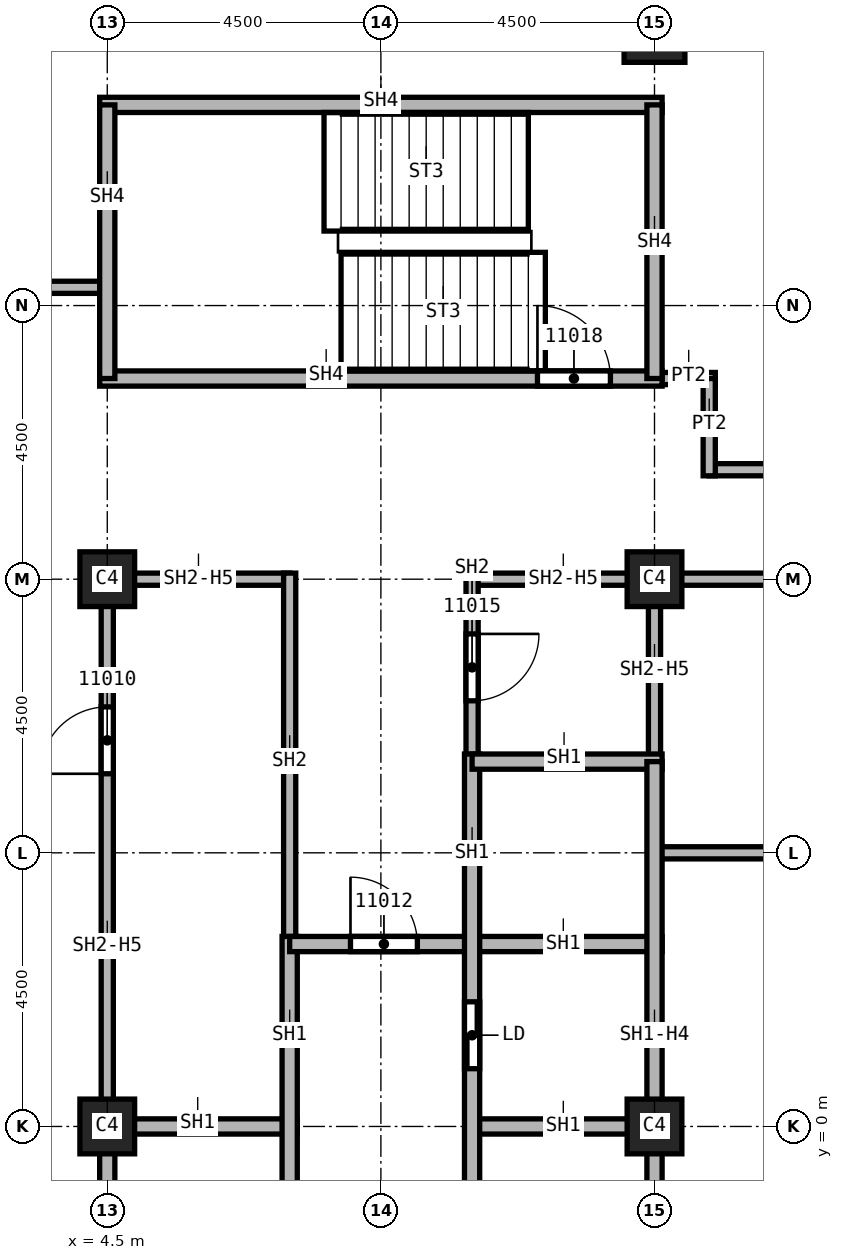
"""IFC4 building model, lengths in metres.
Left out: names, types, materials, properties, quantities, classifications, styles, units other than length and angle.
Written with IfcOpenShell. Run it as: python <this file> out.ifc"""

import sys

from ifc_helpers import new_model, si_unit, direction, frame, frame_2d, origin, origin_2d, place, context, subcontext, project, spatial, rectangle, extrude, element, fill, save


model = new_model("IFC4")
c1 = context("Model", 3, precision=1e-05, world=origin(), true_north=direction((0.0, 1.0)))
c2 = subcontext(c1, "Body", "Model", "MODEL_VIEW")
j1 = project(units=[si_unit("LENGTHUNIT", "METRE"), si_unit("PLANEANGLEUNIT", "RADIAN")], contexts=[c1])
p1 = place(None, origin())
s1 = spatial("IfcSite", under=j1, at=p1, CompositionType="ELEMENT")
p2 = place(p1, origin())
s2 = spatial("IfcBuilding", under=s1, at=p2, CompositionType="ELEMENT")
p3 = place(p2, frame((0.0, 0.0, 184.0)))
s3 = spatial("IfcBuildingStorey", under=s2, at=p3, CompositionType="ELEMENT", Elevation=184.0)
p4 = place(p3, frame((13.5, 18.0, 0.0), z_axis=(0.0, 0.0, 1.0), x_axis=(1.0, 0.0, 0.0)))
e1 = element("IfcColumn", 1, at=p4, inside=s3, PredefinedType="COLUMN", context=c2, shape_type="SweptSolid", body=[
    extrude(rectangle(XDim=1.0, YDim=1.0, at=origin_2d()), origin(), (0.0, 0.0, 1.0), 3.72),
])
for number, where, z_axis, x_axis in (
    (2, (4.5, 0.0, 0.0), (0.0, 0.0, 1.0), (1.0, 0.0, 0.0)),
    (3, (4.5, 9.0, 0.0), (0.0, 0.0, 1.0), (1.0, 0.0, 0.0)),
    (4, (13.5, 0.0, 0.0), (0.0, 0.0, 1.0), (1.0, 0.0, 0.0)),
    (5, (13.5, 9.0, 0.0), (0.0, 0.0, 1.0), (1.0, 0.0, 0.0)),
):
    element("IfcColumn", number, at=place(p3, frame(where, z_axis=z_axis, x_axis=x_axis)), inside=s3, PredefinedType="COLUMN", context=c2, shape_type="SweptSolid", body=[
        extrude(rectangle(XDim=0.9, YDim=0.9, at=origin_2d()), origin(), (0.0, 0.0, 1.0), 3.72),
    ])
p5 = place(p3, frame((0.9, 13.8, 0.0), z_axis=(0.0, 0.0, 1.0), x_axis=(1.0, 0.0, 0.0)))
e6 = element("IfcWall", 6, at=p5, inside=s3, PredefinedType="PARTITIONING", context=c2, shape_type="SweptSolid", body=[
    extrude(rectangle(XDim=3.6, YDim=0.2, at=frame_2d((1.8, 0.0))), origin(), (0.0, 0.0, 1.0), 3.113),
])
p6 = place(p3, frame((13.375, 12.3, 0.0), z_axis=(0.0, 0.0, 1.0), x_axis=(1.0, 0.0, 0.0)))
e7 = element("IfcWall", 7, at=p6, inside=s3, PredefinedType="PARTITIONING", context=c2, shape_type="SweptSolid", body=[
    extrude(rectangle(XDim=1.125, YDim=0.2, at=frame_2d((0.562, 0.0))), origin(), (0.0, 0.0, 1.0), 3.72),
])
for number, where, z_axis, x_axis in (
    (8, (13.5, 4.5, 0.0), (0.0, 0.0, 1.0), (1.0, 0.0, 0.0)),
    (9, (18.0, 9.0, 0.0), (0.0, 0.0, 1.0), (-1.0, 0.0, 0.0)),
):
    element("IfcWall", number, at=place(p3, frame(where, z_axis=z_axis, x_axis=x_axis)), inside=s3, PredefinedType="PARTITIONING", context=c2, shape_type="SweptSolid", body=[
        extrude(rectangle(XDim=4.5, YDim=0.2, at=frame_2d((2.25, 0.0))), origin(), (0.0, 0.0, 1.0), 3.72),
    ])
p7 = place(p3, frame((14.4, 10.8, 0.0), z_axis=(0.0, 0.0, 1.0), x_axis=(1.0, 0.0, 0.0)))
e10 = element("IfcWall", 10, at=p7, inside=s3, PredefinedType="PARTITIONING", context=c2, shape_type="SweptSolid", body=[
    extrude(rectangle(XDim=3.6, YDim=0.2, at=frame_2d((1.8, 0.0))), origin(), (0.0, 0.0, 1.0), 3.72),
])
p8 = place(p3, frame((14.4, 12.3, 0.0), z_axis=(0.0, 0.0, 1.0), x_axis=(0.0, -1.0, 0.0)))
e11 = element("IfcWall", 11, at=p8, inside=s3, PredefinedType="PARTITIONING", context=c2, shape_type="SweptSolid", body=[
    extrude(rectangle(XDim=1.6, YDim=0.2, at=frame_2d((0.8, 0.0))), origin(), (0.0, 0.0, 1.0), 3.72),
])
p9 = place(p3, frame((4.5, 0.0, 0.0), z_axis=(0.0, 0.0, 1.0), x_axis=(0.0, 1.0, 0.0)))
e12 = element("IfcWall", 12, at=p9, inside=s3, PredefinedType="SOLIDWALL", context=c2, shape_type="SweptSolid", body=[
    extrude(rectangle(XDim=9.1, YDim=0.2, at=frame_2d((4.55, 0.0))), origin(), (0.0, 0.0, 1.0), 2.958),
])
p10 = place(p9, frame((5.8, 0.0, 0.0)))
e13 = element("IfcOpeningElement", 13, at=p10, cuts=e12, PredefinedType="OPENING", context=c2, shape_type="SweptSolid", body=[
    extrude(rectangle(XDim=1.1, YDim=2.1, at=frame_2d((0.55, 1.05))), frame((0.0, 0.1, 0.0), z_axis=(0.0, -1.0, 0.0), x_axis=(1.0, 0.0, 0.0)), (0.0, 0.0, 1.0), 0.2),
])
p11 = place(p3, frame((4.5, 9.0, 0.0), z_axis=(0.0, 0.0, 1.0), x_axis=(1.0, 0.0, 0.0)))
e14 = element("IfcWall", 14, at=p11, inside=s3, PredefinedType="SOLIDWALL", context=c2, shape_type="SweptSolid", body=[
    extrude(rectangle(XDim=3.0, YDim=0.2, at=frame_2d((1.5, 0.0))), origin(), (0.0, 0.0, 1.0), 2.958),
])
p12 = place(p3, frame((7.5, 9.1, 0.0), z_axis=(0.0, 0.0, 1.0), x_axis=(0.0, -1.0, 0.0)))
e15 = element("IfcWall", 15, at=p12, inside=s3, PredefinedType="SOLIDWALL", context=c2, shape_type="SweptSolid", body=[
    extrude(rectangle(XDim=6.225, YDim=0.2, at=frame_2d((3.113, 0.0))), origin(), (0.0, 0.0, 1.0), 3.72),
])
p13 = place(p3, frame((10.5, 9.0, 0.0), z_axis=(0.0, 0.0, 1.0), x_axis=(1.0, 0.0, 0.0)))
e16 = element("IfcWall", 16, at=p13, inside=s3, PredefinedType="SOLIDWALL", context=c2, shape_type="SweptSolid", body=[
    extrude(rectangle(XDim=3.1, YDim=0.2, at=frame_2d((1.55, 0.0))), origin(), (0.0, 0.0, 1.0), 2.958),
])
p14 = place(p3, frame((10.5, 9.1, 0.0), z_axis=(0.0, 0.0, 1.0), x_axis=(0.0, -1.0, 0.0)))
e17 = element("IfcWall", 17, at=p14, inside=s3, PredefinedType="SOLIDWALL", context=c2, shape_type="SweptSolid", body=[
    extrude(rectangle(XDim=3.225, YDim=0.2, at=frame_2d((1.613, 0.0))), origin(), (0.0, 0.0, 1.0), 3.72),
])
p15 = place(p14, frame((1.0, 0.0, 0.0)))
e18 = element("IfcOpeningElement", 18, at=p15, cuts=e17, PredefinedType="OPENING", context=c2, shape_type="SweptSolid", body=[
    extrude(rectangle(XDim=1.1, YDim=2.1, at=frame_2d((0.55, 1.05))), frame((0.0, 0.1, 0.0), z_axis=(0.0, -1.0, 0.0), x_axis=(1.0, 0.0, 0.0)), (0.0, 0.0, 1.0), 0.2),
])
p16 = place(p3, frame((13.5, 9.1, 0.0), z_axis=(0.0, 0.0, 1.0), x_axis=(0.0, -1.0, 0.0)))
e19 = element("IfcWall", 19, at=p16, inside=s3, PredefinedType="SOLIDWALL", context=c2, shape_type="SweptSolid", body=[
    extrude(rectangle(XDim=3.1, YDim=0.2, at=frame_2d((1.55, 0.0))), origin(), (0.0, 0.0, 1.0), 2.958),
])
p17 = place(p3, frame((4.375, 0.0, 0.0), z_axis=(0.0, 0.0, 1.0), x_axis=(1.0, 0.0, 0.0)))
e20 = element("IfcWall", 20, at=p17, inside=s3, PredefinedType="SOLIDWALL", context=c2, shape_type="SweptSolid", body=[
    extrude(rectangle(XDim=3.25, YDim=0.25, at=frame_2d((1.625, 0.0))), origin(), (0.0, 0.0, 1.0), 3.72),
])
p18 = place(p3, frame((4.5, -6.0, 0.0), z_axis=(0.0, 0.0, 1.0), x_axis=(0.0, 1.0, 0.0)))
e21 = element("IfcWall", 21, at=p18, inside=s3, PredefinedType="SOLIDWALL", context=c2, shape_type="SweptSolid", body=[
    extrude(rectangle(XDim=6.0, YDim=0.25, at=frame_2d((3.0, 0.0))), origin(), (0.0, 0.0, 1.0), 2.958),
])
p19 = place(p18, frame((0.95, 0.0, 0.0)))
e22 = element("IfcOpeningElement", 22, at=p19, cuts=e21, PredefinedType="OPENING", context=c2, shape_type="SweptSolid", body=[
    extrude(rectangle(XDim=1.1, YDim=2.1, at=frame_2d((0.55, 1.05))), frame((0.0, 0.125, 0.0), z_axis=(0.0, -1.0, 0.0), x_axis=(1.0, 0.0, 0.0)), (0.0, 0.0, 1.0), 0.25),
])
p20 = place(p18, frame((3.95, 0.0, 0.0)))
e23 = element("IfcOpeningElement", 23, at=p20, cuts=e21, PredefinedType="OPENING", context=c2, shape_type="SweptSolid", body=[
    extrude(rectangle(XDim=1.1, YDim=2.1, at=frame_2d((0.55, 1.05))), frame((0.0, 0.125, 0.0), z_axis=(0.0, -1.0, 0.0), x_axis=(1.0, 0.0, 0.0)), (0.0, 0.0, 1.0), 0.25),
])
p21 = place(p3, frame((7.5, 3.125, 0.0), z_axis=(0.0, 0.0, 1.0), x_axis=(0.0, -1.0, 0.0)))
e24 = element("IfcWall", 24, at=p21, inside=s3, PredefinedType="SOLIDWALL", context=c2, shape_type="SweptSolid", body=[
    extrude(rectangle(XDim=9.125, YDim=0.25, at=frame_2d((4.562, 0.0))), origin(), (0.0, 0.0, 1.0), 3.72),
])
p22 = place(p3, frame((7.5, 3.0, 0.0), z_axis=(0.0, 0.0, 1.0), x_axis=(1.0, 0.0, 0.0)))
e25 = element("IfcWall", 25, at=p22, inside=s3, PredefinedType="SOLIDWALL", context=c2, shape_type="SweptSolid", body=[
    extrude(rectangle(XDim=6.125, YDim=0.25, at=frame_2d((3.062, 0.0))), origin(), (0.0, 0.0, 1.0), 3.72),
])
p23 = place(p22, frame((1.0, 0.0, 0.0)))
e26 = element("IfcOpeningElement", 26, at=p23, cuts=e25, PredefinedType="OPENING", context=c2, shape_type="SweptSolid", body=[
    extrude(rectangle(XDim=1.1, YDim=2.1, at=frame_2d((0.55, 1.05))), frame((0.0, 0.125, 0.0), z_axis=(0.0, -1.0, 0.0), x_axis=(1.0, 0.0, 0.0)), (0.0, 0.0, 1.0), 0.25),
])
p24 = place(p3, frame((10.5, 0.0, 0.0), z_axis=(0.0, 0.0, 1.0), x_axis=(1.0, 0.0, 0.0)))
e27 = element("IfcWall", 27, at=p24, inside=s3, PredefinedType="SOLIDWALL", context=c2, shape_type="SweptSolid", body=[
    extrude(rectangle(XDim=3.125, YDim=0.25, at=frame_2d((1.562, 0.0))), origin(), (0.0, 0.0, 1.0), 3.72),
])
p25 = place(p3, frame((10.5, 6.125, 0.0), z_axis=(0.0, 0.0, 1.0), x_axis=(0.0, -1.0, 0.0)))
e28 = element("IfcWall", 28, at=p25, inside=s3, PredefinedType="SOLIDWALL", context=c2, shape_type="SweptSolid", body=[
    extrude(rectangle(XDim=9.25, YDim=0.25, at=frame_2d((4.625, 0.0))), origin(), (0.0, 0.0, 1.0), 3.72),
])
p26 = place(p25, frame((7.075, 0.0, 0.0)))
e29 = element("IfcOpeningElement", 29, at=p26, cuts=e28, PredefinedType="OPENING", context=c2, shape_type="SweptSolid", body=[
    extrude(rectangle(XDim=1.1, YDim=2.1, at=frame_2d((0.55, 1.05))), frame((0.0, 0.125, 0.0), z_axis=(0.0, -1.0, 0.0), x_axis=(1.0, 0.0, 0.0)), (0.0, 0.0, 1.0), 0.25),
])
p27 = place(p25, frame((4.075, 0.0, 0.0)))
e30 = element("IfcOpeningElement", 30, at=p27, cuts=e28, PredefinedType="OPENING", context=c2, shape_type="SweptSolid", body=[
    extrude(rectangle(XDim=1.1, YDim=2.1, at=frame_2d((0.55, 1.05))), frame((0.0, 0.125, 0.0), z_axis=(0.0, -1.0, 0.0), x_axis=(1.0, 0.0, 0.0)), (0.0, 0.0, 1.0), 0.25),
])
p28 = place(p3, frame((10.5, 6.0, 0.0), z_axis=(0.0, 0.0, 1.0), x_axis=(1.0, 0.0, 0.0)))
e31 = element("IfcWall", 31, at=p28, inside=s3, PredefinedType="SOLIDWALL", context=c2, shape_type="SweptSolid", body=[
    extrude(rectangle(XDim=3.125, YDim=0.25, at=frame_2d((1.562, 0.0))), origin(), (0.0, 0.0, 1.0), 3.72),
])
p29 = place(p3, frame((13.5, 6.0, 0.0), z_axis=(0.0, 0.0, 1.0), x_axis=(0.0, -1.0, 0.0)))
e32 = element("IfcWall", 32, at=p29, inside=s3, PredefinedType="SOLIDWALL", context=c2, shape_type="SweptSolid", body=[
    extrude(rectangle(XDim=9.0, YDim=0.25, at=frame_2d((4.5, 0.0))), origin(), (0.0, 0.0, 1.0), 2.958),
])
p30 = place(p3, frame((4.375, 12.3, 0.0), z_axis=(0.0, 0.0, 1.0), x_axis=(1.0, 0.0, 0.0)))
e33 = element("IfcWall", 33, at=p30, inside=s3, PredefinedType="SOLIDWALL", context=c2, shape_type="SweptSolid", body=[
    extrude(rectangle(XDim=9.25, YDim=0.25, at=frame_2d((4.625, 0.0))), origin(), (0.0, 0.0, 1.0), 3.72),
])
p31 = place(p30, frame((7.2, 0.0, 0.0)))
e34 = element("IfcOpeningElement", 34, at=p31, cuts=e33, PredefinedType="OPENING", context=c2, shape_type="SweptSolid", body=[
    extrude(rectangle(XDim=1.2, YDim=2.1, at=frame_2d((0.6, 1.05))), frame((0.0, 0.125, 0.0), z_axis=(0.0, -1.0, 0.0), x_axis=(1.0, 0.0, 0.0)), (0.0, 0.0, 1.0), 0.25),
])
p32 = place(p3, frame((4.375, 16.8, 0.0), z_axis=(0.0, 0.0, 1.0), x_axis=(1.0, 0.0, 0.0)))
e35 = element("IfcWall", 35, at=p32, inside=s3, PredefinedType="SOLIDWALL", context=c2, shape_type="SweptSolid", body=[
    extrude(rectangle(XDim=9.25, YDim=0.25, at=frame_2d((4.625, 0.0))), origin(), (0.0, 0.0, 1.0), 3.72),
])
for number, where, z_axis, x_axis in (
    (36, (4.5, 12.3, 0.0), (0.0, 0.0, 1.0), (0.0, 1.0, 0.0)),
    (37, (13.5, 16.8, 0.0), (0.0, 0.0, 1.0), (0.0, -1.0, 0.0)),
):
    element("IfcWall", number, at=place(p3, frame(where, z_axis=z_axis, x_axis=x_axis)), inside=s3, PredefinedType="SOLIDWALL", context=c2, shape_type="SweptSolid", body=[
        extrude(rectangle(XDim=4.5, YDim=0.25, at=frame_2d((2.25, 0.0))), origin(), (0.0, 0.0, 1.0), 3.72),
    ])
p33 = place(p10, origin())
e38 = element("IfcDoor", 38, at=p33, inside=s3, OperationType="SINGLE_SWING_LEFT", PredefinedType="DOOR", context=c2, shape_type="SweptSolid", body=[
    extrude(rectangle(XDim=1.1, YDim=2.1, at=frame_2d((0.55, 1.05))), frame((0.0, 0.025, 0.0), z_axis=(0.0, -1.0, 0.0), x_axis=(1.0, 0.0, 0.0)), (0.0, 0.0, 1.0), 0.05),
])
fill(e13, e38)
p34 = place(p23, origin())
e39 = element("IfcDoor", 39, at=p34, inside=s3, OperationType="SINGLE_SWING_LEFT", PredefinedType="DOOR", context=c2, shape_type="SweptSolid", body=[
    extrude(rectangle(XDim=1.1, YDim=2.1, at=frame_2d((0.55, 1.05))), frame((0.0, 0.025, 0.0), z_axis=(0.0, -1.0, 0.0), x_axis=(1.0, 0.0, 0.0)), (0.0, 0.0, 1.0), 0.05),
])
fill(e26, e39)
p35 = place(p15, origin())
e40 = element("IfcDoor", 40, at=p35, inside=s3, OperationType="SINGLE_SWING_RIGHT", PredefinedType="DOOR", context=c2, shape_type="SweptSolid", body=[
    extrude(rectangle(XDim=1.1, YDim=2.1, at=frame_2d((0.55, 1.05))), frame((0.0, 0.025, 0.0), z_axis=(0.0, -1.0, 0.0), x_axis=(1.0, 0.0, 0.0)), (0.0, 0.0, 1.0), 0.05),
])
fill(e18, e40)
p36 = place(p31, origin())
e41 = element("IfcDoor", 41, at=p36, inside=s3, OperationType="SINGLE_SWING_LEFT", PredefinedType="DOOR", context=c2, shape_type="SweptSolid", body=[
    extrude(rectangle(XDim=1.2, YDim=2.1, at=frame_2d((0.6, 1.05))), frame((0.0, 0.025, 0.0), z_axis=(0.0, -1.0, 0.0), x_axis=(1.0, 0.0, 0.0)), (0.0, 0.0, 1.0), 0.05),
])
fill(e34, e41)
p37 = place(p27, origin())
e42 = element("IfcDoor", 42, at=p37, inside=s3, OperationType="SLIDING_TO_LEFT", PredefinedType="DOOR", context=c2, shape_type="SweptSolid", body=[
    extrude(rectangle(XDim=1.1, YDim=2.1, at=frame_2d((0.55, 1.05))), frame((0.0, 0.025, 0.0), z_axis=(0.0, -1.0, 0.0), x_axis=(1.0, 0.0, 0.0)), (0.0, 0.0, 1.0), 0.05),
])
fill(e30, e42)
save(model, sys.argv[1])
